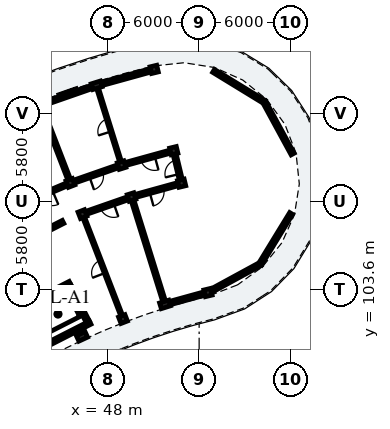
"""IFC4 building model, lengths in metres.
Left out: names, types, materials, properties, quantities, classifications, styles, units other than length and angle.
Written with IfcOpenShell. Run it as: python <this file> out.ifc"""

import sys

from ifc_helpers import new_model, si_unit, direction, frame, frame_2d, origin, origin_2d, place, context, subcontext, project, spatial, rectangle, extrude, element, fill, save


model = new_model("IFC4")
c1 = context("Model", 3, precision=1e-05, world=origin(), true_north=direction((0.0, 1.0)))
c2 = subcontext(c1, "Body", "Model", "MODEL_VIEW")
j1 = project(units=[si_unit("LENGTHUNIT", "METRE"), si_unit("PLANEANGLEUNIT", "RADIAN")], contexts=[c1])
p1 = place(None, origin())
s1 = spatial("IfcSite", under=j1, at=p1, CompositionType="ELEMENT")
p2 = place(p1, origin())
s2 = spatial("IfcBuilding", under=s1, at=p2, CompositionType="ELEMENT")
p3 = place(p2, frame((0.0, 0.0, 42.44)))
s3 = spatial("IfcBuildingStorey", under=s2, at=p3, CompositionType="ELEMENT", Elevation=42.44)
p4 = place(p3, frame((42.597, 102.561, 0.0), z_axis=(0.0, 0.0, 1.0), x_axis=(0.891001200497, 0.454000947921, 0.0)))
e1 = element("IfcWall", 1, at=p4, inside=s3, PredefinedType="SHEAR", context=c2, shape_type="SweptSolid", body=[
    extrude(rectangle(XDim=3.26, YDim=0.23, at=frame_2d((1.63, 0.0))), origin(), (0.0, 0.0, 1.0), 3.11),
])
p5 = place(p4, frame((0.9, 0.0, 0.0)))
e2 = element("IfcOpeningElement", 2, at=p5, cuts=e1, PredefinedType="OPENING", context=c2, shape_type="SweptSolid", body=[
    extrude(rectangle(XDim=1.1, YDim=2.15, at=frame_2d((0.55, 1.075))), frame((0.0, 0.125, 0.0), z_axis=(0.0, -1.0, 0.0), x_axis=(1.0, 0.0, 0.0)), (0.0, 0.0, 1.0), 0.25),
])
p6 = place(p3, frame((43.927, 99.95, 0.0), z_axis=(0.0, 0.0, 1.0), x_axis=(0.891016635648, 0.453970654337, 0.0)))
e3 = element("IfcWall", 3, at=p6, inside=s3, PredefinedType="SHEAR", context=c2, shape_type="SweptSolid", body=[
    extrude(rectangle(XDim=3.26, YDim=0.23, at=frame_2d((1.63, 0.0))), origin(), (0.0, 0.0, 1.0), 3.11),
])
p7 = place(p3, frame((45.451, 103.886, 0.0), z_axis=(0.0, 0.0, 1.0), x_axis=(0.454000278178, -0.891001541758, 0.0)))
e4 = element("IfcWall", 4, at=p7, inside=s3, PredefinedType="SHEAR", context=c2, shape_type="SweptSolid", body=[
    extrude(rectangle(XDim=2.7, YDim=0.23, at=frame_2d((1.35, 0.0))), origin(), (0.0, 0.0, 1.0), 3.11),
])
for number, where, z_axis, x_axis in (
    (5, (54.582, 103.412, 0.0), (0.0, 0.0, 1.0), (-0.234, 0.972, 0.0)),
    (6, (52.847, 110.606, 0.0), (0.0, 0.0, 1.0), (-0.234, 0.972, 0.0)),
    (7, (52.331, 112.744, 0.0), (0.0, 0.0, 1.0), (-0.234, 0.972, 0.0)),
    (8, (51.042, 118.091, 0.0), (0.0, 0.0, 1.0), (-0.234, 0.972, 0.0)),
):
    element("IfcColumn", number, at=place(p3, frame(where, z_axis=z_axis, x_axis=x_axis)), inside=s3, PredefinedType="COLUMN", context=c2, shape_type="SweptSolid", body=[
        extrude(rectangle(XDim=0.45, YDim=0.45, at=origin_2d()), origin(), (0.0, 0.0, 1.0), 3.12),
    ])
p8 = place(p3, frame((51.757, 102.631, 0.0), z_axis=(0.0, 0.0, 1.0), x_axis=(-0.297930292146, 0.954587628781, 0.0)))
e9 = element("IfcColumn", 9, at=p8, inside=s3, PredefinedType="PILASTER", context=c2, shape_type="SweptSolid", body=[
    extrude(rectangle(XDim=0.39, YDim=0.63, at=origin_2d()), origin(), (0.0, 0.0, 1.0), 3.12),
])
for number, where, z_axis, x_axis in (
    (10, (49.552, 109.695, 0.0), (0.0, 0.0, 1.0), (-0.298, 0.955, 0.0)),
    (11, (48.897, 111.795, 0.0), (0.0, 0.0, 1.0), (-0.298, 0.955, 0.0)),
):
    element("IfcColumn", number, at=place(p3, frame(where, z_axis=z_axis, x_axis=x_axis)), inside=s3, PredefinedType="COLUMN", context=c2, shape_type="SweptSolid", body=[
        extrude(rectangle(XDim=0.45, YDim=0.45, at=origin_2d()), origin(), (0.0, 0.0, 1.0), 3.12),
    ])
p9 = place(p3, frame((47.258, 117.046, 0.0), z_axis=(0.0, 0.0, 1.0), x_axis=(-0.297930292146, 0.954587628781, 0.0)))
e12 = element("IfcColumn", 12, at=p9, inside=s3, PredefinedType="PILASTER", context=c2, shape_type="SweptSolid", body=[
    extrude(rectangle(XDim=0.39, YDim=0.63, at=origin_2d()), origin(), (0.0, 0.0, 1.0), 3.12),
])
for number, where, z_axis, x_axis in (
    (13, (48.99, 101.667, 0.0), (0.0, 0.0, 1.0), (-0.36, 0.933, 0.0)),
    (14, (46.325, 108.57, 0.0), (0.0, 0.0, 1.0), (-0.36, 0.933, 0.0)),
    (15, (45.532, 110.622, 0.0), (0.0, 0.0, 1.0), (-0.36, 0.933, 0.0)),
):
    element("IfcColumn", number, at=place(p3, frame(where, z_axis=z_axis, x_axis=x_axis)), inside=s3, PredefinedType="COLUMN", context=c2, shape_type="SweptSolid", body=[
        extrude(rectangle(XDim=0.45, YDim=0.45, at=origin_2d()), origin(), (0.0, 0.0, 1.0), 3.12),
    ])
p10 = place(p3, frame((46.293, 100.522, 0.0), z_axis=(0.0, 0.0, 1.0), x_axis=(-0.420859924104, 0.907125638643, 0.0)))
e16 = element("IfcColumn", 16, at=p10, inside=s3, PredefinedType="PILASTER", context=c2, shape_type="SweptSolid", body=[
    extrude(rectangle(XDim=0.39, YDim=0.63, at=origin_2d()), origin(), (0.0, 0.0, 1.0), 3.12),
])
p11 = place(p3, frame((50.854, 118.039, 0.0), z_axis=(0.0, 0.0, 1.0), x_axis=(-0.963879958287, -0.266337053398, 0.0)))
e17 = element("IfcWall", 17, at=p11, inside=s3, PredefinedType="SOLIDWALL", context=c2, shape_type="SweptSolid", body=[
    extrude(rectangle(XDim=3.566, YDim=0.225, at=frame_2d((1.783, 0.0))), origin(), (0.0, 0.0, 1.0), 2.355),
])
p12 = place(p11, frame((1.043, 0.0, 0.55)))
e18 = element("IfcOpeningElement", 18, at=p12, cuts=e17, PredefinedType="OPENING", context=c2, shape_type="SweptSolid", body=[
    extrude(rectangle(XDim=1.48, YDim=1.62, at=frame_2d((0.74, 0.81))), frame((0.0, 0.123, 0.0), z_axis=(0.0, -1.0, 0.0), x_axis=(1.0, 0.0, 0.0)), (0.0, 0.0, 1.0), 0.245),
])
p13 = place(p3, frame((54.394, 103.36, 0.0), z_axis=(0.0, 0.0, 1.0), x_axis=(-0.963881704158, -0.266330734968, 0.0)))
e19 = element("IfcWall", 19, at=p13, inside=s3, PredefinedType="SOLIDWALL", context=c2, shape_type="SweptSolid", body=[
    extrude(rectangle(XDim=2.57, YDim=0.225, at=frame_2d((1.285, 0.0))), origin(), (0.0, 0.0, 1.0), 2.355),
])
p14 = place(p13, frame((0.605, 0.0, 0.55)))
e20 = element("IfcOpeningElement", 20, at=p14, cuts=e19, PredefinedType="OPENING", context=c2, shape_type="SweptSolid", body=[
    extrude(rectangle(XDim=1.36, YDim=1.61, at=frame_2d((0.68, 0.805))), frame((0.0, 0.123, 0.0), z_axis=(0.0, -1.0, 0.0), x_axis=(1.0, 0.0, 0.0)), (0.0, 0.0, 1.0), 0.245),
])
p15 = place(p3, frame((47.103, 116.991, 0.0), z_axis=(0.0, 0.0, 1.0), x_axis=(-0.944238799482, -0.329261430405, 0.0)))
e21 = element("IfcWall", 21, at=p15, inside=s3, PredefinedType="SOLIDWALL", context=c2, shape_type="SweptSolid", body=[
    extrude(rectangle(XDim=3.566, YDim=0.225, at=frame_2d((1.783, 0.0))), origin(), (0.0, 0.0, 1.0), 2.355),
])
p16 = place(p15, frame((1.183, 0.0, 0.55)))
e22 = element("IfcOpeningElement", 22, at=p16, cuts=e21, PredefinedType="OPENING", context=c2, shape_type="SweptSolid", body=[
    extrude(rectangle(XDim=1.2, YDim=1.51, at=frame_2d((0.6, 0.755))), frame((0.0, 0.123, 0.0), z_axis=(0.0, -1.0, 0.0), x_axis=(1.0, 0.0, 0.0)), (0.0, 0.0, 1.0), 0.245),
])
p17 = place(p3, frame((54.949, 117.993, 0.0), z_axis=(0.0, 0.0, 1.0), x_axis=(0.85314128216, -0.521679933171, 0.0)))
e23 = element("IfcWall", 23, at=p17, inside=s3, PredefinedType="SOLIDWALL", context=c2, shape_type="SweptSolid", body=[
    extrude(rectangle(XDim=3.908, YDim=0.225, at=frame_2d((1.954, 0.0))), origin(), (0.0, 0.0, 1.0), 2.355),
])
p18 = place(p17, frame((0.979, 0.0, 0.4)))
e24 = element("IfcOpeningElement", 24, at=p18, cuts=e23, PredefinedType="OPENING", context=c2, shape_type="SweptSolid", body=[
    extrude(rectangle(XDim=1.95, YDim=1.78, at=frame_2d((0.975, 0.89))), frame((0.0, 0.123, 0.0), z_axis=(0.0, -1.0, 0.0), x_axis=(1.0, 0.0, 0.0)), (0.0, 0.0, 1.0), 0.245),
])
p19 = place(p3, frame((58.283, 115.954, 0.0), z_axis=(0.0, 0.0, 1.0), x_axis=(0.478002823483, -0.878358298613, 0.0)))
e25 = element("IfcWall", 25, at=p19, inside=s3, PredefinedType="SOLIDWALL", context=c2, shape_type="SweptSolid", body=[
    extrude(rectangle(XDim=3.908, YDim=0.225, at=frame_2d((1.954, 0.0))), origin(), (0.0, 0.0, 1.0), 2.355),
])
p20 = place(p3, frame((60.053, 108.614, 0.0), z_axis=(0.0, 0.0, 1.0), x_axis=(-0.521652131435, -0.85315828178, 0.0)))
e26 = element("IfcWall", 26, at=p20, inside=s3, PredefinedType="SOLIDWALL", context=c2, shape_type="SweptSolid", body=[
    extrude(rectangle(XDim=3.908, YDim=0.225, at=frame_2d((1.954, 0.0))), origin(), (0.0, 0.0, 1.0), 2.355),
])
p21 = place(p20, frame((0.979, 0.0, 0.4)))
e27 = element("IfcOpeningElement", 27, at=p21, cuts=e26, PredefinedType="OPENING", context=c2, shape_type="SweptSolid", body=[
    extrude(rectangle(XDim=1.95, YDim=1.78, at=frame_2d((0.975, 0.89))), frame((0.0, 0.123, 0.0), z_axis=(0.0, -1.0, 0.0), x_axis=(1.0, 0.0, 0.0)), (0.0, 0.0, 1.0), 0.245),
])
p22 = place(p3, frame((58.014, 105.28, 0.0), z_axis=(0.0, 0.0, 1.0), x_axis=(-0.87837025386, -0.477980854359, 0.0)))
e28 = element("IfcWall", 28, at=p22, inside=s3, PredefinedType="SOLIDWALL", context=c2, shape_type="SweptSolid", body=[
    extrude(rectangle(XDim=3.908, YDim=0.225, at=frame_2d((1.954, 0.0))), origin(), (0.0, 0.0, 1.0), 2.355),
])
p23 = place(p3, frame((40.682, 105.834, 0.0), z_axis=(0.0, 0.0, 1.0), x_axis=(0.891003372311, 0.453996685595, 0.0)))
e29 = element("IfcWall", 29, at=p23, inside=s3, PredefinedType="PARTITIONING", context=c2, shape_type="SweptSolid", body=[
    extrude(rectangle(XDim=4.9, YDim=0.22, at=frame_2d((2.45, 0.0))), origin(), (0.0, 0.0, 1.0), 2.34),
])
p24 = place(p23, frame((1.95, 0.0, 0.0)))
e30 = element("IfcOpeningElement", 30, at=p24, cuts=e29, PredefinedType="OPENING", context=c2, shape_type="SweptSolid", body=[
    extrude(rectangle(XDim=1.0, YDim=2.15, at=frame_2d((0.5, 1.075))), frame((0.0, 0.12, 0.0), z_axis=(0.0, -1.0, 0.0), x_axis=(1.0, 0.0, 0.0)), (0.0, 0.0, 1.0), 0.24),
])
p25 = place(p3, frame((51.994, 112.651, 0.0), z_axis=(0.0, 0.0, 1.0), x_axis=(-0.963890789093, -0.266297853356, 0.0)))
e31 = element("IfcWall", 31, at=p25, inside=s3, PredefinedType="PARTITIONING", context=c2, shape_type="SweptSolid", body=[
    extrude(rectangle(XDim=2.863, YDim=0.205, at=frame_2d((1.432, 0.0))), origin(), (0.0, 0.0, 1.0), 2.37),
])
p26 = place(p25, frame((0.957, 0.0, 0.0)))
e32 = element("IfcOpeningElement", 32, at=p26, cuts=e31, PredefinedType="OPENING", context=c2, shape_type="SweptSolid", body=[
    extrude(rectangle(XDim=0.95, YDim=2.13, at=frame_2d((0.475, 1.065))), frame((0.0, 0.113, 0.0), z_axis=(0.0, -1.0, 0.0), x_axis=(1.0, 0.0, 0.0)), (0.0, 0.0, 1.0), 0.225),
])
p27 = place(p3, frame((52.51, 110.512, 0.0), z_axis=(0.0, 0.0, 1.0), x_axis=(-0.96388375821, -0.266323301006, 0.0)))
e33 = element("IfcWall", 33, at=p27, inside=s3, PredefinedType="PARTITIONING", context=c2, shape_type="SweptSolid", body=[
    extrude(rectangle(XDim=2.718, YDim=0.205, at=frame_2d((1.359, 0.0))), origin(), (0.0, 0.0, 1.0), 2.37),
])
p28 = place(p27, frame((0.884, 0.0, 0.0)))
e34 = element("IfcOpeningElement", 34, at=p28, cuts=e33, PredefinedType="OPENING", context=c2, shape_type="SweptSolid", body=[
    extrude(rectangle(XDim=0.95, YDim=2.13, at=frame_2d((0.475, 1.065))), frame((0.0, 0.113, 0.0), z_axis=(0.0, -1.0, 0.0), x_axis=(1.0, 0.0, 0.0)), (0.0, 0.0, 1.0), 0.225),
])
p29 = place(p3, frame((48.778, 112.177, 0.0), z_axis=(0.0, 0.0, 1.0), x_axis=(-0.297905254614, 0.954595442726, 0.0)))
e35 = element("IfcWall", 35, at=p29, inside=s3, PredefinedType="PARTITIONING", context=c2, shape_type="SweptSolid", body=[
    extrude(rectangle(XDim=4.7, YDim=0.125, at=frame_2d((2.35, 0.0))), origin(), (0.0, 0.0, 1.0), 2.37),
])
p30 = place(p29, frame((1.915, 0.0, 0.0)))
e36 = element("IfcOpeningElement", 36, at=p30, cuts=e35, PredefinedType="OPENING", context=c2, shape_type="SweptSolid", body=[
    extrude(rectangle(XDim=0.87, YDim=2.08, at=frame_2d((0.435, 1.04))), frame((0.0, 0.073, 0.0), z_axis=(0.0, -1.0, 0.0), x_axis=(1.0, 0.0, 0.0)), (0.0, 0.0, 1.0), 0.145),
])
p31 = place(p3, frame((51.638, 103.013, 0.0), z_axis=(0.0, 0.0, 1.0), x_axis=(-0.2979590431, 0.954578655028, 0.0)))
e37 = element("IfcWall", 37, at=p31, inside=s3, PredefinedType="PARTITIONING", context=c2, shape_type="SweptSolid", body=[
    extrude(rectangle(XDim=6.6, YDim=0.185, at=frame_2d((3.3, 0.0))), origin(), (0.0, 0.0, 1.0), 2.37),
])
p32 = place(p3, frame((48.566, 111.68, 0.0), z_axis=(0.0, 0.0, 1.0), x_axis=(-0.944253820929, -0.329218349522, 0.0)))
e38 = element("IfcWall", 38, at=p32, inside=s3, PredefinedType="PARTITIONING", context=c2, shape_type="SweptSolid", body=[
    extrude(rectangle(XDim=2.863, YDim=0.205, at=frame_2d((1.432, 0.0))), origin(), (0.0, 0.0, 1.0), 2.37),
])
p33 = place(p32, frame((0.967, 0.0, 0.0)))
e39 = element("IfcOpeningElement", 39, at=p33, cuts=e38, PredefinedType="OPENING", context=c2, shape_type="SweptSolid", body=[
    extrude(rectangle(XDim=0.93, YDim=2.12, at=frame_2d((0.465, 1.06))), frame((0.0, 0.113, 0.0), z_axis=(0.0, -1.0, 0.0), x_axis=(1.0, 0.0, 0.0)), (0.0, 0.0, 1.0), 0.225),
])
p34 = place(p3, frame((49.222, 109.58, 0.0), z_axis=(0.0, 0.0, 1.0), x_axis=(-0.944265123647, -0.329185929627, 0.0)))
e40 = element("IfcWall", 40, at=p34, inside=s3, PredefinedType="PARTITIONING", context=c2, shape_type="SweptSolid", body=[
    extrude(rectangle(XDim=2.718, YDim=0.205, at=frame_2d((1.359, 0.0))), origin(), (0.0, 0.0, 1.0), 2.37),
])
p35 = place(p34, frame((0.894, 0.0, 0.0)))
e41 = element("IfcOpeningElement", 41, at=p35, cuts=e40, PredefinedType="OPENING", context=c2, shape_type="SweptSolid", body=[
    extrude(rectangle(XDim=0.93, YDim=2.12, at=frame_2d((0.465, 1.06))), frame((0.0, 0.113, 0.0), z_axis=(0.0, -1.0, 0.0), x_axis=(1.0, 0.0, 0.0)), (0.0, 0.0, 1.0), 0.225),
])
p36 = place(p3, frame((45.388, 110.996, 0.0), z_axis=(0.0, 0.0, 1.0), x_axis=(-0.360186633854, 0.932880264982, 0.0)))
e42 = element("IfcWall", 42, at=p36, inside=s3, PredefinedType="PARTITIONING", context=c2, shape_type="SweptSolid", body=[
    extrude(rectangle(XDim=4.7, YDim=0.185, at=frame_2d((2.35, 0.0))), origin(), (0.0, 0.0, 1.0), 2.37),
])
p37 = place(p3, frame((48.846, 102.04, 0.0), z_axis=(0.0, 0.0, 1.0), x_axis=(-0.360183473608, 0.932881485152, 0.0)))
e43 = element("IfcWall", 43, at=p37, inside=s3, PredefinedType="PARTITIONING", context=c2, shape_type="SweptSolid", body=[
    extrude(rectangle(XDim=6.6, YDim=0.125, at=frame_2d((3.3, 0.0))), origin(), (0.0, 0.0, 1.0), 2.37),
])
p38 = place(p37, frame((2.855, 0.0, 0.0)))
e44 = element("IfcOpeningElement", 44, at=p38, cuts=e43, PredefinedType="OPENING", context=c2, shape_type="SweptSolid", body=[
    extrude(rectangle(XDim=0.89, YDim=2.1, at=frame_2d((0.445, 1.05))), frame((0.0, 0.073, 0.0), z_axis=(0.0, -1.0, 0.0), x_axis=(1.0, 0.0, 0.0)), (0.0, 0.0, 1.0), 0.145),
])
p39 = place(p3, frame((45.21, 110.486, 0.0), z_axis=(0.0, 0.0, 1.0), x_axis=(-0.920511160294, -0.390716270168, 0.0)))
e45 = element("IfcWall", 45, at=p39, inside=s3, PredefinedType="PARTITIONING", context=c2, shape_type="SweptSolid", body=[
    extrude(rectangle(XDim=2.863, YDim=0.205, at=frame_2d((1.432, 0.0))), origin(), (0.0, 0.0, 1.0), 2.37),
])
p40 = place(p39, frame((0.937, 0.0, 0.0)))
e46 = element("IfcOpeningElement", 46, at=p40, cuts=e45, PredefinedType="OPENING", context=c2, shape_type="SweptSolid", body=[
    extrude(rectangle(XDim=0.99, YDim=2.16, at=frame_2d((0.495, 1.08))), frame((0.0, 0.113, 0.0), z_axis=(0.0, -1.0, 0.0), x_axis=(1.0, 0.0, 0.0)), (0.0, 0.0, 1.0), 0.225),
])
p41 = place(p3, frame((52.835, 110.654, 0.0), z_axis=(0.0, 0.0, 1.0), x_axis=(-0.23437535251, 0.972146179407, 0.0)))
e47 = element("IfcWall", 47, at=p41, inside=s3, PredefinedType="PARTITIONING", context=c2, shape_type="SweptSolid", body=[
    extrude(rectangle(XDim=2.1, YDim=0.205, at=frame_2d((1.05, 0.0))), origin(), (0.0, 0.0, 1.0), 2.37),
])
p42 = place(p41, frame((0.57, 0.0, 0.0)))
e48 = element("IfcOpeningElement", 48, at=p42, cuts=e47, PredefinedType="OPENING", context=c2, shape_type="SweptSolid", body=[
    extrude(rectangle(XDim=0.95, YDim=2.13, at=frame_2d((0.475, 1.065))), frame((0.0, 0.113, 0.0), z_axis=(0.0, -1.0, 0.0), x_axis=(1.0, 0.0, 0.0)), (0.0, 0.0, 1.0), 0.225),
])
p43 = place(p12, origin())
e49 = element("IfcWindow", 49, at=p43, inside=s3, PartitioningType="SINGLE_PANEL", PredefinedType="WINDOW", context=c2, shape_type="SweptSolid", body=[
    extrude(rectangle(XDim=1.48, YDim=1.62, at=frame_2d((0.74, 0.81))), frame((0.0, 0.03, 0.0), z_axis=(0.0, -1.0, 0.0), x_axis=(1.0, 0.0, 0.0)), (0.0, 0.0, 1.0), 0.06),
])
fill(e18, e49)
p44 = place(p14, origin())
e50 = element("IfcWindow", 50, at=p44, inside=s3, PartitioningType="SINGLE_PANEL", PredefinedType="WINDOW", context=c2, shape_type="SweptSolid", body=[
    extrude(rectangle(XDim=1.36, YDim=1.61, at=frame_2d((0.68, 0.805))), frame((0.0, 0.03, 0.0), z_axis=(0.0, -1.0, 0.0), x_axis=(1.0, 0.0, 0.0)), (0.0, 0.0, 1.0), 0.06),
])
fill(e20, e50)
p45 = place(p16, origin())
e51 = element("IfcWindow", 51, at=p45, inside=s3, PartitioningType="SINGLE_PANEL", PredefinedType="WINDOW", context=c2, shape_type="SweptSolid", body=[
    extrude(rectangle(XDim=1.2, YDim=1.51, at=frame_2d((0.6, 0.755))), frame((0.0, 0.03, 0.0), z_axis=(0.0, -1.0, 0.0), x_axis=(1.0, 0.0, 0.0)), (0.0, 0.0, 1.0), 0.06),
])
fill(e22, e51)
p46 = place(p18, origin())
e52 = element("IfcWindow", 52, at=p46, inside=s3, PartitioningType="SINGLE_PANEL", PredefinedType="WINDOW", context=c2, shape_type="SweptSolid", body=[
    extrude(rectangle(XDim=1.95, YDim=1.78, at=frame_2d((0.975, 0.89))), frame((0.0, 0.03, 0.0), z_axis=(0.0, -1.0, 0.0), x_axis=(1.0, 0.0, 0.0)), (0.0, 0.0, 1.0), 0.06),
])
fill(e24, e52)
p47 = place(p21, origin())
e53 = element("IfcWindow", 53, at=p47, inside=s3, PartitioningType="SINGLE_PANEL", PredefinedType="WINDOW", context=c2, shape_type="SweptSolid", body=[
    extrude(rectangle(XDim=1.95, YDim=1.78, at=frame_2d((0.975, 0.89))), frame((0.0, 0.03, 0.0), z_axis=(0.0, -1.0, 0.0), x_axis=(1.0, 0.0, 0.0)), (0.0, 0.0, 1.0), 0.06),
])
fill(e27, e53)
p48 = place(p5, origin())
e54 = element("IfcDoor", 54, at=p48, inside=s3, OperationType="DOUBLE_DOOR_SLIDING", PredefinedType="DOOR", context=c2, shape_type="SweptSolid", body=[
    extrude(rectangle(XDim=1.1, YDim=2.15, at=frame_2d((0.55, 1.075))), frame((0.0, 0.025, 0.0), z_axis=(0.0, -1.0, 0.0), x_axis=(1.0, 0.0, 0.0)), (0.0, 0.0, 1.0), 0.05),
])
fill(e2, e54)
p49 = place(p26, origin())
e55 = element("IfcDoor", 55, at=p49, inside=s3, OperationType="SINGLE_SWING_LEFT", PredefinedType="DOOR", context=c2, shape_type="SweptSolid", body=[
    extrude(rectangle(XDim=0.95, YDim=2.13, at=frame_2d((0.475, 1.065))), frame((0.0, 0.025, 0.0), z_axis=(0.0, -1.0, 0.0), x_axis=(1.0, 0.0, 0.0)), (0.0, 0.0, 1.0), 0.05),
])
fill(e32, e55)
p50 = place(p28, origin())
e56 = element("IfcDoor", 56, at=p50, inside=s3, OperationType="SINGLE_SWING_RIGHT", PredefinedType="DOOR", context=c2, shape_type="SweptSolid", body=[
    extrude(rectangle(XDim=0.95, YDim=2.13, at=frame_2d((0.475, 1.065))), frame((0.0, 0.025, 0.0), z_axis=(0.0, -1.0, 0.0), x_axis=(1.0, 0.0, 0.0)), (0.0, 0.0, 1.0), 0.05),
])
fill(e34, e56)
p51 = place(p30, origin())
e57 = element("IfcDoor", 57, at=p51, inside=s3, OperationType="SINGLE_SWING_LEFT", PredefinedType="DOOR", context=c2, shape_type="SweptSolid", body=[
    extrude(rectangle(XDim=0.87, YDim=2.08, at=frame_2d((0.435, 1.04))), frame((0.0, 0.025, 0.0), z_axis=(0.0, -1.0, 0.0), x_axis=(1.0, 0.0, 0.0)), (0.0, 0.0, 1.0), 0.05),
])
fill(e36, e57)
p52 = place(p33, origin())
e58 = element("IfcDoor", 58, at=p52, inside=s3, OperationType="SINGLE_SWING_RIGHT", PredefinedType="DOOR", context=c2, shape_type="SweptSolid", body=[
    extrude(rectangle(XDim=0.93, YDim=2.12, at=frame_2d((0.465, 1.06))), frame((0.0, 0.025, 0.0), z_axis=(0.0, -1.0, 0.0), x_axis=(1.0, 0.0, 0.0)), (0.0, 0.0, 1.0), 0.05),
])
fill(e39, e58)
p53 = place(p35, origin())
e59 = element("IfcDoor", 59, at=p53, inside=s3, OperationType="SINGLE_SWING_LEFT", PredefinedType="DOOR", context=c2, shape_type="SweptSolid", body=[
    extrude(rectangle(XDim=0.93, YDim=2.12, at=frame_2d((0.465, 1.06))), frame((0.0, 0.025, 0.0), z_axis=(0.0, -1.0, 0.0), x_axis=(1.0, 0.0, 0.0)), (0.0, 0.0, 1.0), 0.05),
])
fill(e41, e59)
p54 = place(p38, origin())
e60 = element("IfcDoor", 60, at=p54, inside=s3, OperationType="SINGLE_SWING_LEFT", PredefinedType="DOOR", context=c2, shape_type="SweptSolid", body=[
    extrude(rectangle(XDim=0.89, YDim=2.1, at=frame_2d((0.445, 1.05))), frame((0.0, 0.025, 0.0), z_axis=(0.0, -1.0, 0.0), x_axis=(1.0, 0.0, 0.0)), (0.0, 0.0, 1.0), 0.05),
])
fill(e44, e60)
p55 = place(p40, origin())
e61 = element("IfcDoor", 61, at=p55, inside=s3, OperationType="SINGLE_SWING_LEFT", PredefinedType="DOOR", context=c2, shape_type="SweptSolid", body=[
    extrude(rectangle(XDim=0.99, YDim=2.16, at=frame_2d((0.495, 1.08))), frame((0.0, 0.025, 0.0), z_axis=(0.0, -1.0, 0.0), x_axis=(1.0, 0.0, 0.0)), (0.0, 0.0, 1.0), 0.05),
])
fill(e46, e61)
p56 = place(p42, origin())
e62 = element("IfcDoor", 62, at=p56, inside=s3, OperationType="SINGLE_SWING_LEFT", PredefinedType="DOOR", context=c2, shape_type="SweptSolid", body=[
    extrude(rectangle(XDim=0.95, YDim=2.13, at=frame_2d((0.475, 1.065))), frame((0.0, 0.025, 0.0), z_axis=(0.0, -1.0, 0.0), x_axis=(1.0, 0.0, 0.0)), (0.0, 0.0, 1.0), 0.05),
])
fill(e48, e62)
save(model, sys.argv[1])
